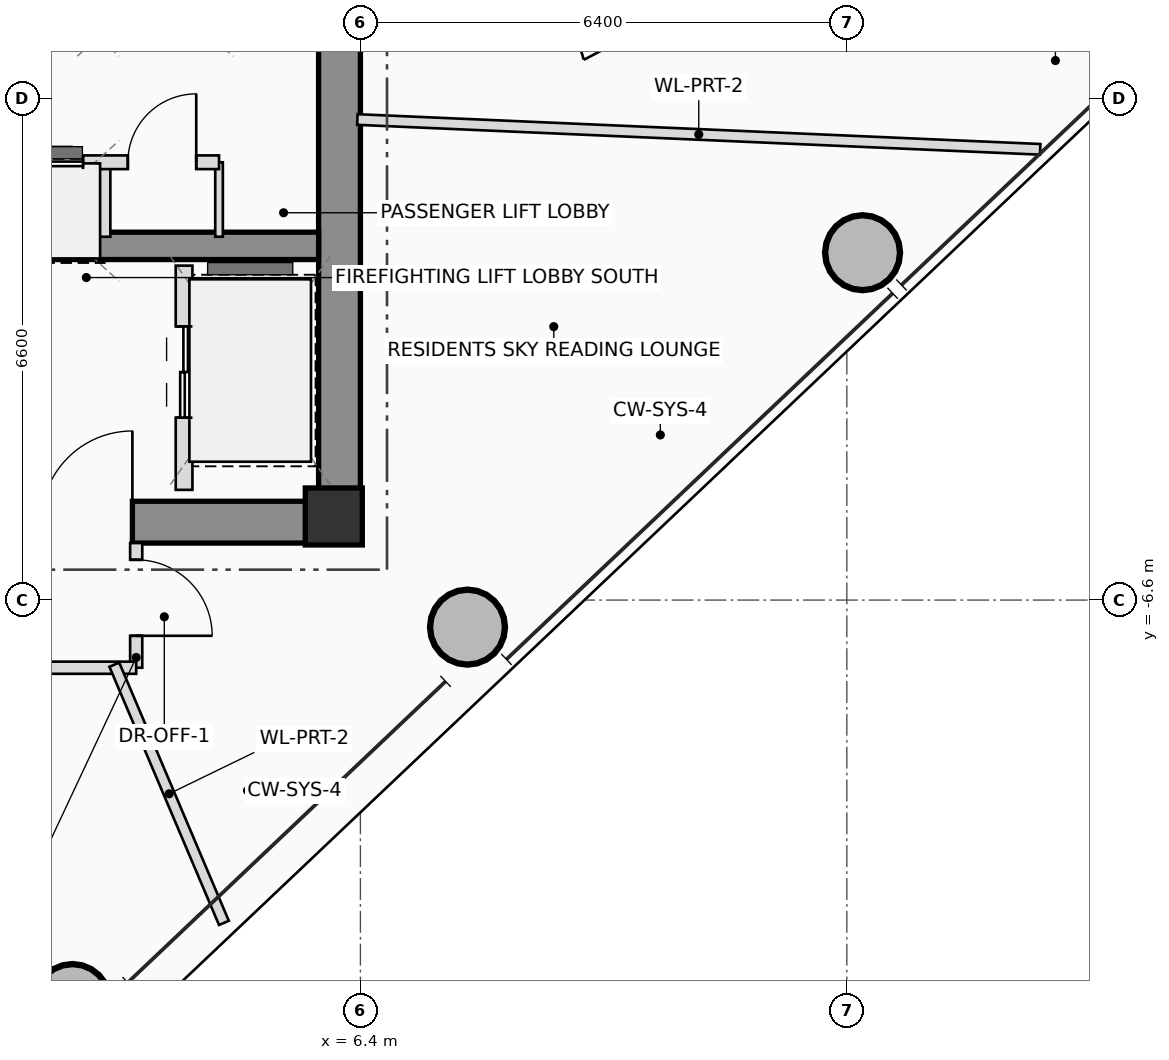
"""IFC4 building model, lengths in metres.
Left out: names, types, materials, properties, quantities, classifications, styles, units other than length and angle.
Written with IfcOpenShell. Run it as: python <this file> out.ifc"""

import sys

from ifc_helpers import new_model, si_unit, direction, frame, frame_2d, origin, origin_2d, place, context, subcontext, project, spatial, rectangle, hollow_circle, extrude, source, transform, mapped, element, fill, save


model = new_model("IFC4")
c1 = context("Model", 3, precision=1e-05, world=origin(), true_north=direction((0.0, 1.0)))
c2 = subcontext(c1, "Body", "Model", "MODEL_VIEW")
j1 = project(units=[si_unit("LENGTHUNIT", "METRE"), si_unit("PLANEANGLEUNIT", "RADIAN")], contexts=[c1])
p1 = place(None, origin())
s1 = spatial("IfcSite", under=j1, at=p1, CompositionType="ELEMENT")
p2 = place(p1, origin())
s2 = spatial("IfcBuilding", under=s1, at=p2, CompositionType="ELEMENT")
p3 = place(p2, frame((0.0, 0.0, 232.05)))
s3 = spatial("IfcBuildingStorey", under=s2, at=p3, CompositionType="ELEMENT", Elevation=232.05)
m1 = source(origin(), c2, "Body", "SweptSolid", [
    extrude(rectangle(XDim=0.75, YDim=0.75, at=origin_2d()), origin(), (0.0, 0.0, 1.0), 3.4),
])
p4 = place(p3, frame((6.05, -5.5, 0.0), z_axis=(0.0, 0.0, 1.0), x_axis=(1.0, 0.0, 0.0)))
e1 = element("IfcColumn", 1, at=p4, inside=s3, PredefinedType="COLUMN", context=c2, shape_type="MappedRepresentation", body=[
    mapped(m1, transform((0.0, 0.0, 0.0), scale=1.0)),
])
p5 = place(p3, frame((-6.4, -5.575, 0.0), z_axis=(0.0, 0.0, 1.0), x_axis=(1.0, 0.0, 0.0)))
e2 = element("IfcWall", 2, at=p5, inside=s3, PredefinedType="SHEAR", context=c2, shape_type="SweptSolid", body=[
    extrude(rectangle(XDim=12.8, YDim=0.55, at=frame_2d((6.4, 0.0))), origin(), (0.0, 0.0, 1.0), 3.4),
])
p6 = place(p5, frame((8.6, 0.0, 0.0)))
e3 = element("IfcOpeningElement", 3, at=p6, cuts=e2, PredefinedType="OPENING", context=c2, shape_type="SweptSolid", body=[
    extrude(rectangle(XDim=1.2, YDim=2.2, at=frame_2d((0.6, 1.1))), frame((0.0, 0.285, 0.0), z_axis=(0.0, -1.0, 0.0), x_axis=(1.0, 0.0, 0.0)), (0.0, 0.0, 1.0), 0.57),
])
p7 = place(p3, frame((6.125, -5.3, 0.0), z_axis=(0.0, 0.0, 1.0), x_axis=(0.0, 1.0, 0.0)))
e4 = element("IfcWall", 4, at=p7, inside=s3, PredefinedType="SHEAR", context=c2, shape_type="SweptSolid", body=[
    extrude(rectangle(XDim=10.6, YDim=0.55, at=frame_2d((5.3, 0.0))), origin(), (0.0, 0.0, 1.0), 3.4),
])
p8 = place(p3, frame((-5.85, -1.94, 0.0), z_axis=(0.0, 0.0, 1.0), x_axis=(1.0, 0.0, 0.0)))
e5 = element("IfcWall", 5, at=p8, inside=s3, PredefinedType="SHEAR", context=c2, shape_type="SweptSolid", body=[
    extrude(rectangle(XDim=11.7, YDim=0.36, at=frame_2d((5.85, 0.0))), origin(), (0.0, 0.0, 1.0), 3.4),
])
m2 = source(origin(), c2, "Body", "SweptSolid", [
    extrude(hollow_circle(Radius=0.5, WallThickness=0.04, at=origin_2d()), origin(), (0.0, 0.0, 1.0), 3.4),
])
for number, where, z_axis, x_axis in (
    (6, (2.611, -11.882, 0.0), (0.0, 0.0, 1.0), (1.0, 0.0, 0.0)),
    (7, (7.809, -6.956, 0.0), (0.0, 0.0, 1.0), (1.0, 0.0, 0.0)),
    (8, (13.007, -2.03, 0.0), (0.0, 0.0, 1.0), (1.0, 0.0, 0.0)),
):
    element("IfcColumn", number, at=place(p3, frame(where, z_axis=z_axis, x_axis=x_axis)), inside=s3, PredefinedType="COLUMN", context=c2, shape_type="MappedRepresentation", body=[
        mapped(m2, transform((0.0, 0.0, 0.0), scale=1.0)),
    ])
p9 = place(p3, frame((4.08, -5.15, 0.0), z_axis=(0.0, 0.0, 1.0), x_axis=(0.0, 1.0, 0.0)))
e9 = element("IfcWall", 9, at=p9, inside=s3, PredefinedType="PLUMBINGWALL", context=c2, shape_type="SweptSolid", body=[
    extrude(rectangle(XDim=2.95, YDim=0.22, at=frame_2d((1.475, 0.0))), origin(), (0.0, 0.0, 1.0), 3.2),
])
p10 = place(p9, frame((0.95, 0.0, 0.0)))
e10 = element("IfcOpeningElement", 10, at=p10, cuts=e9, PredefinedType="OPENING", context=c2, shape_type="SweptSolid", body=[
    extrude(rectangle(XDim=1.2, YDim=2.25, at=frame_2d((0.6, 1.125))), frame((0.0, 0.12, 0.0), z_axis=(0.0, -1.0, 0.0), x_axis=(1.0, 0.0, 0.0)), (0.0, 0.0, 1.0), 0.24),
])
p11 = place(p3, frame((3.02, -1.82, 0.0), z_axis=(0.0, 0.0, 1.0), x_axis=(0.0, 1.0, 0.0)))
e11 = element("IfcWall", 11, at=p11, inside=s3, PredefinedType="PLUMBINGWALL", context=c2, shape_type="SweptSolid", body=[
    extrude(rectangle(XDim=0.98, YDim=0.18, at=frame_2d((0.49, 0.0))), origin(), (0.0, 0.0, 1.0), 3.2),
])
p12 = place(p3, frame((4.54, -1.82, 0.0), z_axis=(0.0, 0.0, 1.0), x_axis=(0.0, 1.0, 0.0)))
e12 = element("IfcWall", 12, at=p12, inside=s3, PredefinedType="PARTITIONING", context=c2, shape_type="SweptSolid", body=[
    extrude(rectangle(XDim=0.98, YDim=0.1, at=frame_2d((0.49, 0.0))), origin(), (0.0, 0.0, 1.0), 3.2),
])
p13 = place(p3, frame((-5.68, -0.84, 0.0), z_axis=(0.0, 0.0, 1.0), x_axis=(1.0, 0.0, 0.0)))
e13 = element("IfcWall", 13, at=p13, inside=s3, PredefinedType="PLUMBINGWALL", context=c2, shape_type="SweptSolid", body=[
    extrude(rectangle(XDim=10.22, YDim=0.18, at=frame_2d((5.11, 0.0))), origin(), (0.0, 0.0, 1.0), 3.2),
])
p14 = place(p13, frame((1.88, 0.0, 0.0)))
e14 = element("IfcOpeningElement", 14, at=p14, cuts=e13, PredefinedType="OPENING", context=c2, shape_type="SweptSolid", body=[
    extrude(rectangle(XDim=0.9, YDim=2.05, at=frame_2d((0.45, 1.025))), frame((0.0, 0.1, 0.0), z_axis=(0.0, -1.0, 0.0), x_axis=(1.0, 0.0, 0.0)), (0.0, 0.0, 1.0), 0.2),
])
p15 = place(p13, frame((5.35, 0.0, 0.0)))
e15 = element("IfcOpeningElement", 15, at=p15, cuts=e13, PredefinedType="OPENING", context=c2, shape_type="SweptSolid", body=[
    extrude(rectangle(XDim=0.9, YDim=2.05, at=frame_2d((0.45, 1.025))), frame((0.0, 0.1, 0.0), z_axis=(0.0, -1.0, 0.0), x_axis=(1.0, 0.0, 0.0)), (0.0, 0.0, 1.0), 0.2),
])
p16 = place(p13, frame((7.33, 0.0, 0.0)))
e16 = element("IfcOpeningElement", 16, at=p16, cuts=e13, PredefinedType="OPENING", context=c2, shape_type="SweptSolid", body=[
    extrude(rectangle(XDim=1.1, YDim=2.2, at=frame_2d((0.55, 1.1))), frame((0.0, 0.1, 0.0), z_axis=(0.0, -1.0, 0.0), x_axis=(1.0, 0.0, 0.0)), (0.0, 0.0, 1.0), 0.2),
])
p17 = place(p13, frame((9.02, 0.0, 0.0)))
e17 = element("IfcOpeningElement", 17, at=p17, cuts=e13, PredefinedType="OPENING", context=c2, shape_type="SweptSolid", body=[
    extrude(rectangle(XDim=0.9, YDim=2.05, at=frame_2d((0.45, 1.025))), frame((0.0, 0.1, 0.0), z_axis=(0.0, -1.0, 0.0), x_axis=(1.0, 0.0, 0.0)), (0.0, 0.0, 1.0), 0.2),
])
p18 = place(p3, frame((3.45, -5.85, 0.0), z_axis=(0.0, 0.0, 1.0), x_axis=(0.0, -1.0, 0.0)))
e18 = element("IfcWall", 18, at=p18, inside=s3, PredefinedType="PARTITIONING", context=c2, shape_type="SweptSolid", body=[
    extrude(rectangle(XDim=1.64, YDim=0.16, at=frame_2d((0.82, 0.0))), origin(), (0.0, 0.0, 1.0), 3.2),
])
p19 = place(p18, frame((0.22, 0.0, 0.0)))
e19 = element("IfcOpeningElement", 19, at=p19, cuts=e18, PredefinedType="OPENING", context=c2, shape_type="SweptSolid", body=[
    extrude(rectangle(XDim=1.0, YDim=2.25, at=frame_2d((0.5, 1.125))), frame((0.0, 0.09, 0.0), z_axis=(0.0, -1.0, 0.0), x_axis=(1.0, 0.0, 0.0)), (0.0, 0.0, 1.0), 0.18),
])
p20 = place(p3, frame((3.45, -7.49, 0.0), z_axis=(0.0, 0.0, 1.0), x_axis=(-1.0, 0.0, 0.0)))
e20 = element("IfcWall", 20, at=p20, inside=s3, PredefinedType="PARTITIONING", context=c2, shape_type="SweptSolid", body=[
    extrude(rectangle(XDim=9.81, YDim=0.16, at=frame_2d((4.905, 0.0))), origin(), (0.0, 0.0, 1.0), 2.605),
])
p21 = place(p20, frame((1.911, 0.0, 0.0)))
e21 = element("IfcOpeningElement", 21, at=p21, cuts=e20, PredefinedType="OPENING", context=c2, shape_type="SweptSolid", body=[
    extrude(rectangle(XDim=1.0, YDim=2.25, at=frame_2d((0.5, 1.125))), frame((0.0, 0.09, 0.0), z_axis=(0.0, -1.0, 0.0), x_axis=(1.0, 0.0, 0.0)), (0.0, 0.0, 1.0), 0.18),
])
p22 = place(p20, frame((6.583, 0.0, 0.0)))
e22 = element("IfcOpeningElement", 22, at=p22, cuts=e20, PredefinedType="OPENING", context=c2, shape_type="SweptSolid", body=[
    extrude(rectangle(XDim=1.0, YDim=2.25, at=frame_2d((0.5, 1.125))), frame((0.0, 0.09, 0.0), z_axis=(0.0, -1.0, 0.0), x_axis=(1.0, 0.0, 0.0)), (0.0, 0.0, 1.0), 0.18),
])
p23 = place(p3, frame((6.36, -0.278, 0.0), z_axis=(0.0, 0.0, 1.0), x_axis=(0.99904773846, -0.043630451279, 0.0)))
e23 = element("IfcWall", 23, at=p23, inside=s3, PredefinedType="PARTITIONING", context=c2, shape_type="SweptSolid", body=[
    extrude(rectangle(XDim=8.992, YDim=0.14, at=frame_2d((4.496, 0.0))), origin(), (0.0, 0.0, 1.0), 2.605),
])
p24 = place(p3, frame((3.162, -7.45, 0.0), z_axis=(0.0, 0.0, 1.0), x_axis=(0.39072313519, -0.920508246366, 0.0)))
e24 = element("IfcWall", 24, at=p24, inside=s3, PredefinedType="PARTITIONING", context=c2, shape_type="SweptSolid", body=[
    extrude(rectangle(XDim=3.69, YDim=0.14, at=frame_2d((1.845, 0.0))), origin(), (0.0, 0.0, 1.0), 2.605),
])
p25 = place(p6, origin())
e25 = element("IfcDoor", 25, at=p25, inside=s3, OperationType="SINGLE_SWING_RIGHT", PredefinedType="DOOR", context=c2, shape_type="SweptSolid", body=[
    extrude(rectangle(XDim=1.2, YDim=2.2, at=frame_2d((0.6, 1.1))), frame((0.0, 0.025, 0.0), z_axis=(0.0, -1.0, 0.0), x_axis=(1.0, 0.0, 0.0)), (0.0, 0.0, 1.0), 0.05),
])
fill(e3, e25)
p26 = place(p10, origin())
e26 = element("IfcDoor", 26, at=p26, inside=s3, OperationType="DOUBLE_DOOR_SLIDING", PredefinedType="DOOR", context=c2, shape_type="SweptSolid", body=[
    extrude(rectangle(XDim=1.2, YDim=2.25, at=frame_2d((0.6, 1.125))), frame((0.0, 0.025, 0.0), z_axis=(0.0, -1.0, 0.0), x_axis=(1.0, 0.0, 0.0)), (0.0, 0.0, 1.0), 0.05),
])
fill(e10, e26)
p27 = place(p16, origin())
e27 = element("IfcDoor", 27, at=p27, inside=s3, OperationType="DOUBLE_DOOR_SLIDING", PredefinedType="DOOR", context=c2, shape_type="SweptSolid", body=[
    extrude(rectangle(XDim=1.1, YDim=2.2, at=frame_2d((0.55, 1.1))), frame((0.0, 0.025, 0.0), z_axis=(0.0, -1.0, 0.0), x_axis=(1.0, 0.0, 0.0)), (0.0, 0.0, 1.0), 0.05),
])
fill(e16, e27)
p28 = place(p17, origin())
e28 = element("IfcDoor", 28, at=p28, inside=s3, OperationType="SINGLE_SWING_RIGHT", PredefinedType="DOOR", context=c2, shape_type="SweptSolid", body=[
    extrude(rectangle(XDim=0.9, YDim=2.05, at=frame_2d((0.45, 1.025))), frame((0.0, 0.025, 0.0), z_axis=(0.0, -1.0, 0.0), x_axis=(1.0, 0.0, 0.0)), (0.0, 0.0, 1.0), 0.05),
])
fill(e17, e28)
p29 = place(p19, origin())
e29 = element("IfcDoor", 29, at=p29, inside=s3, OperationType="SINGLE_SWING_RIGHT", PredefinedType="DOOR", context=c2, shape_type="SweptSolid", body=[
    extrude(rectangle(XDim=1.0, YDim=2.25, at=frame_2d((0.5, 1.125))), frame((0.0, 0.025, 0.0), z_axis=(0.0, -1.0, 0.0), x_axis=(1.0, 0.0, 0.0)), (0.0, 0.0, 1.0), 0.05),
])
fill(e19, e29)
save(model, sys.argv[1])
